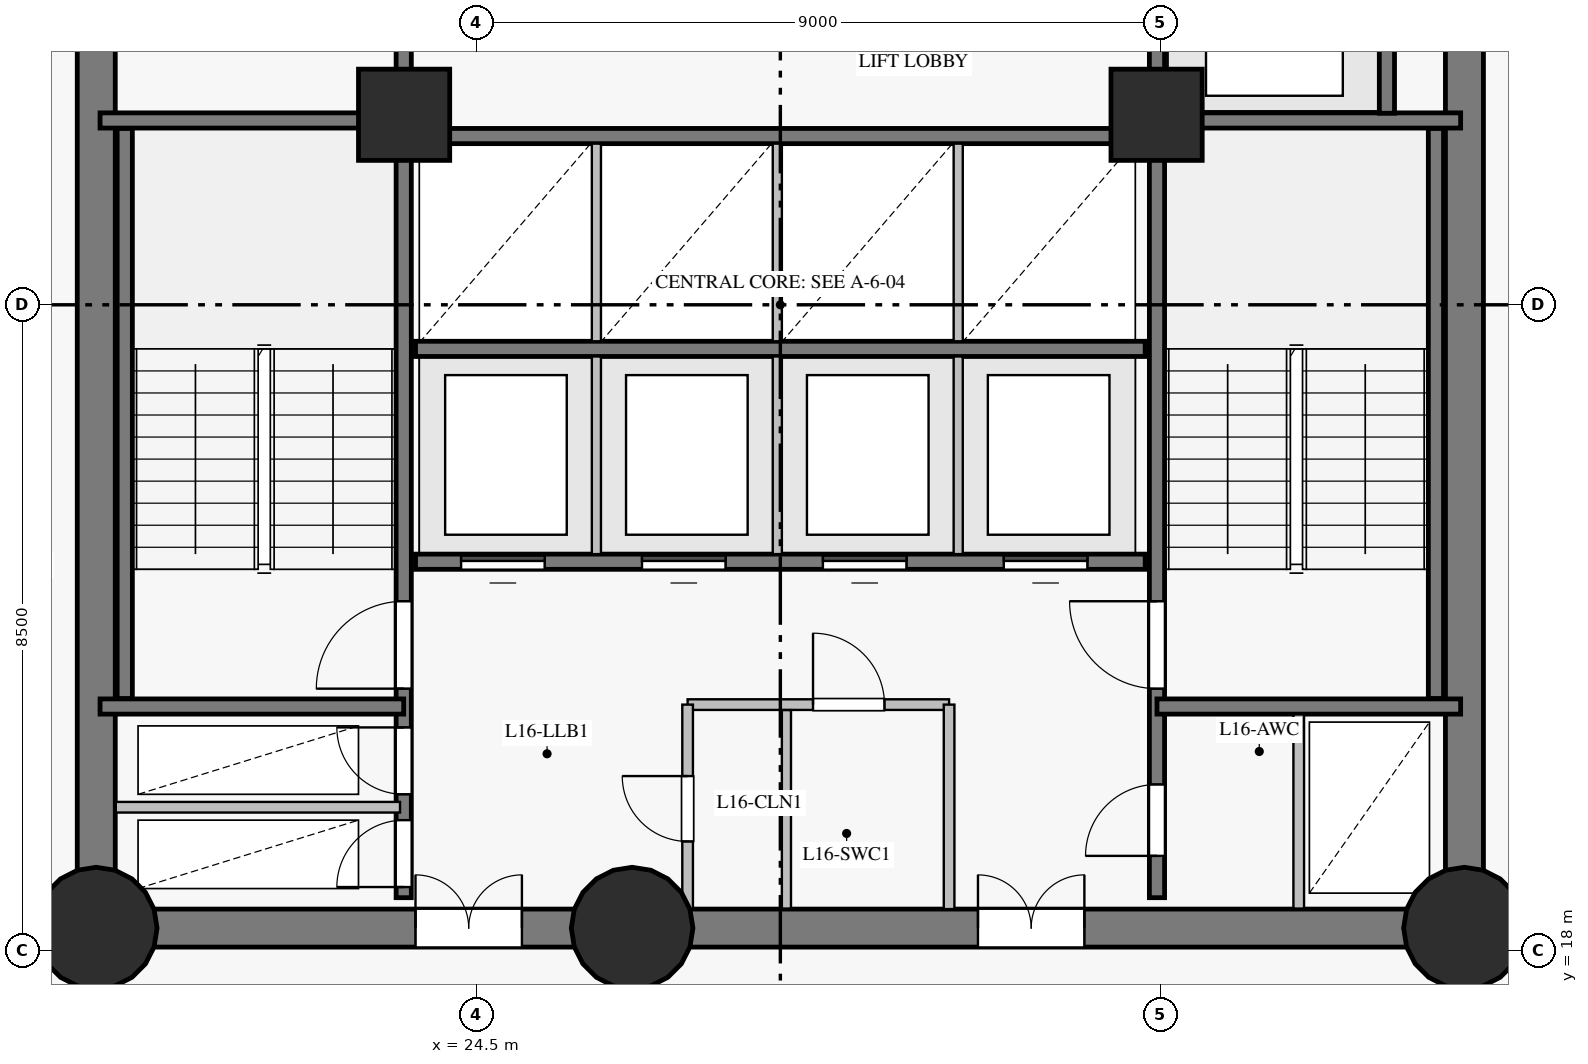
"""IFC4 building model, lengths in metres.
Left out: names, types, materials, properties, quantities, classifications, styles, units other than length and angle.
Written with IfcOpenShell. Run it as: python <this file> out.ifc"""

import sys

from ifc_helpers import new_model, si_unit, direction, frame, frame_2d, origin, origin_with_axes, origin_2d, place, context, subcontext, project, spatial, rectangle, circle, extrude, source, transform, mapped, element, fill, save


model = new_model("IFC4")
c1 = context("Model", 3, precision=1e-05, world=origin(), true_north=direction((0.0, 1.0)))
c2 = subcontext(c1, "Body", "Model", "MODEL_VIEW")
j1 = project(units=[si_unit("LENGTHUNIT", "METRE"), si_unit("PLANEANGLEUNIT", "RADIAN")], contexts=[c1])
p1 = place(None, origin())
s1 = spatial("IfcSite", under=j1, at=p1, CompositionType="ELEMENT")
p2 = place(p1, origin())
s2 = spatial("IfcBuilding", under=s1, at=p2, CompositionType="ELEMENT")
p3 = place(p2, frame((0.0, 0.0, 62.5)))
s3 = spatial("IfcBuildingStorey", under=s2, at=p3, CompositionType="ELEMENT", Elevation=62.5)
p4 = place(p3, frame((19.5, 18.3, 0.0), z_axis=(0.0, 0.0, 1.0), x_axis=(1.0, 0.0, 0.0)))
e1 = element("IfcWall", 1, at=p4, inside=s3, PredefinedType="SHEAR", context=c2, shape_type="SweptSolid", body=[
    extrude(rectangle(XDim=7.05, YDim=0.5, at=frame_2d((3.525, 0.0))), origin(), (0.0, 0.0, 1.0), 3.35),
])
p5 = place(p4, frame((4.2, 0.0, 0.0)))
e2 = element("IfcOpeningElement", 2, at=p5, cuts=e1, PredefinedType="OPENING", context=c2, shape_type="SweptSolid", body=[
    extrude(rectangle(XDim=1.4, YDim=2.2, at=frame_2d((0.7, 1.1))), frame((0.0, 0.26, 0.0), z_axis=(0.0, -1.0, 0.0), x_axis=(1.0, 0.0, 0.0)), (0.0, 0.0, 1.0), 0.52),
])
p6 = place(p3, frame((26.55, 18.3, 0.0), z_axis=(0.0, 0.0, 1.0), x_axis=(1.0, 0.0, 0.0)))
e3 = element("IfcWall", 3, at=p6, inside=s3, PredefinedType="SHEAR", context=c2, shape_type="SweptSolid", body=[
    extrude(rectangle(XDim=10.95, YDim=0.5, at=frame_2d((5.475, 0.0))), origin(), (0.0, 0.0, 1.0), 3.35),
])
p7 = place(p6, frame((4.55, 0.0, 0.0)))
e4 = element("IfcOpeningElement", 4, at=p7, cuts=e3, PredefinedType="OPENING", context=c2, shape_type="SweptSolid", body=[
    extrude(rectangle(XDim=1.4, YDim=2.2, at=frame_2d((0.7, 1.1))), frame((0.0, 0.26, 0.0), z_axis=(0.0, -1.0, 0.0), x_axis=(1.0, 0.0, 0.0)), (0.0, 0.0, 1.0), 0.52),
])
p8 = place(p3, frame((37.5, 18.3, 0.0), z_axis=(0.0, 0.0, 1.0), x_axis=(0.0, 1.0, 0.0)))
e5 = element("IfcWall", 5, at=p8, inside=s3, PredefinedType="SHEAR", context=c2, shape_type="SweptSolid", body=[
    extrude(rectangle(XDim=16.4, YDim=0.5, at=frame_2d((8.2, 0.0))), origin(), (0.0, 0.0, 1.0), 3.35),
])
p9 = place(p8, frame((14.06, 0.0, 0.0)))
e6 = element("IfcOpeningElement", 6, at=p9, cuts=e5, PredefinedType="OPENING", context=c2, shape_type="SweptSolid", body=[
    extrude(rectangle(XDim=1.2, YDim=2.15, at=frame_2d((0.6, 1.075))), frame((0.0, 0.26, 0.0), z_axis=(0.0, -1.0, 0.0), x_axis=(1.0, 0.0, 0.0)), (0.0, 0.0, 1.0), 0.52),
])
p10 = place(p3, frame((19.5, 34.7, 0.0), z_axis=(0.0, 0.0, 1.0), x_axis=(0.0, -1.0, 0.0)))
e7 = element("IfcWall", 7, at=p10, inside=s3, PredefinedType="SHEAR", context=c2, shape_type="SweptSolid", body=[
    extrude(rectangle(XDim=16.4, YDim=0.5, at=frame_2d((8.2, 0.0))), origin(), (0.0, 0.0, 1.0), 3.35),
])
p11 = place(p10, frame((3.1, 0.0, 0.0)))
e8 = element("IfcOpeningElement", 8, at=p11, cuts=e7, PredefinedType="OPENING", context=c2, shape_type="SweptSolid", body=[
    extrude(rectangle(XDim=1.1, YDim=2.15, at=frame_2d((0.55, 1.075))), frame((0.0, 0.26, 0.0), z_axis=(0.0, -1.0, 0.0), x_axis=(1.0, 0.0, 0.0)), (0.0, 0.0, 1.0), 0.52),
])
m1 = source(origin_with_axes(), c2, "Body", "SweptSolid", [
    extrude(circle(Radius=0.8, at=origin_2d()), origin(), (0.0, 0.0, 1.0), 3.6),
])
for number, where, z_axis, x_axis in (
    (9, (19.5, 18.3, 0.0), (0.0, 0.0, 1.0), (1.0, 0.0, 0.0)),
    (10, (26.55, 18.3, 0.0), (0.0, 0.0, 1.0), (1.0, 0.0, 0.0)),
    (11, (37.5, 18.3, 0.0), (0.0, 0.0, 1.0), (1.0, 0.0, 0.0)),
):
    element("IfcColumn", number, at=place(p3, frame(where, z_axis=z_axis, x_axis=x_axis)), inside=s3, PredefinedType="COLUMN", context=c2, shape_type="MappedRepresentation", body=[
        mapped(m1, transform((0.0, 0.0, 0.0), scale=1.0)),
    ])
m2 = source(origin_with_axes(), c2, "Body", "SweptSolid", [
    extrude(rectangle(XDim=1.2, YDim=1.2, at=origin_2d()), origin(), (0.0, 0.0, 1.0), 3.6),
])
for number, where, z_axis, x_axis in (
    (12, (23.55, 29.0, 0.0), (0.0, 0.0, 1.0), (1.0, 0.0, 0.0)),
    (13, (33.45, 29.0, 0.0), (0.0, 0.0, 1.0), (1.0, 0.0, 0.0)),
):
    element("IfcColumn", number, at=place(p3, frame(where, z_axis=z_axis, x_axis=x_axis)), inside=s3, PredefinedType="COLUMN", context=c2, shape_type="MappedRepresentation", body=[
        mapped(m2, transform((0.0, 0.0, 0.0), scale=1.0)),
    ])
p12 = place(p3, frame((23.545, 18.7, 0.0), z_axis=(0.0, 0.0, 1.0), x_axis=(0.0, 1.0, 0.0)))
e14 = element("IfcWall", 14, at=p12, inside=s3, PredefinedType="SHEAR", context=c2, shape_type="SweptSolid", body=[
    extrude(rectangle(XDim=15.6, YDim=0.2, at=frame_2d((7.8, 0.0))), origin(), (0.0, 0.0, 1.0), 3.35),
])
p13 = place(p12, frame((2.75, 0.0, 0.0)))
e15 = element("IfcOpeningElement", 15, at=p13, cuts=e14, PredefinedType="OPENING", context=c2, shape_type="SweptSolid", body=[
    extrude(rectangle(XDim=1.15, YDim=2.15, at=frame_2d((0.575, 1.075))), frame((0.0, 0.11, 0.0), z_axis=(0.0, -1.0, 0.0), x_axis=(1.0, 0.0, 0.0)), (0.0, 0.0, 1.0), 0.22),
])
p14 = place(p12, frame((0.14, 0.0, 0.0)))
e16 = element("IfcOpeningElement", 16, at=p14, cuts=e14, PredefinedType="OPENING", context=c2, shape_type="SweptSolid", body=[
    extrude(rectangle(XDim=0.88, YDim=2.1, at=frame_2d((0.44, 1.05))), frame((0.0, 0.11, 0.0), z_axis=(0.0, -1.0, 0.0), x_axis=(1.0, 0.0, 0.0)), (0.0, 0.0, 1.0), 0.22),
])
p15 = place(p12, frame((1.36, 0.0, 0.0)))
e17 = element("IfcOpeningElement", 17, at=p15, cuts=e14, PredefinedType="OPENING", context=c2, shape_type="SweptSolid", body=[
    extrude(rectangle(XDim=0.88, YDim=2.1, at=frame_2d((0.44, 1.05))), frame((0.0, 0.11, 0.0), z_axis=(0.0, -1.0, 0.0), x_axis=(1.0, 0.0, 0.0)), (0.0, 0.0, 1.0), 0.22),
])
p16 = place(p12, frame((12.1, 0.0, 0.0)))
e18 = element("IfcOpeningElement", 18, at=p16, cuts=e14, PredefinedType="OPENING", context=c2, shape_type="SweptSolid", body=[
    extrude(rectangle(XDim=1.12, YDim=2.15, at=frame_2d((0.56, 1.075))), frame((0.0, 0.11, 0.0), z_axis=(0.0, -1.0, 0.0), x_axis=(1.0, 0.0, 0.0)), (0.0, 0.0, 1.0), 0.22),
])
p17 = place(p12, frame((14.05, 0.0, 0.0)))
e19 = element("IfcOpeningElement", 19, at=p17, cuts=e14, PredefinedType="OPENING", context=c2, shape_type="SweptSolid", body=[
    extrude(rectangle(XDim=1.12, YDim=2.15, at=frame_2d((0.56, 1.075))), frame((0.0, 0.11, 0.0), z_axis=(0.0, -1.0, 0.0), x_axis=(1.0, 0.0, 0.0)), (0.0, 0.0, 1.0), 0.22),
])
p18 = place(p3, frame((33.455, 18.7, 0.0), z_axis=(0.0, 0.0, 1.0), x_axis=(0.0, 1.0, 0.0)))
e20 = element("IfcWall", 20, at=p18, inside=s3, PredefinedType="SHEAR", context=c2, shape_type="SweptSolid", body=[
    extrude(rectangle(XDim=15.6, YDim=0.2, at=frame_2d((7.8, 0.0))), origin(), (0.0, 0.0, 1.0), 3.35),
])
p19 = place(p18, frame((2.75, 0.0, 0.0)))
e21 = element("IfcOpeningElement", 21, at=p19, cuts=e20, PredefinedType="OPENING", context=c2, shape_type="SweptSolid", body=[
    extrude(rectangle(XDim=1.15, YDim=2.15, at=frame_2d((0.575, 1.075))), frame((0.0, 0.11, 0.0), z_axis=(0.0, -1.0, 0.0), x_axis=(1.0, 0.0, 0.0)), (0.0, 0.0, 1.0), 0.22),
])
p20 = place(p18, frame((0.55, 0.0, 0.0)))
e22 = element("IfcOpeningElement", 22, at=p20, cuts=e20, PredefinedType="OPENING", context=c2, shape_type="SweptSolid", body=[
    extrude(rectangle(XDim=0.94, YDim=2.1, at=frame_2d((0.47, 1.05))), frame((0.0, 0.11, 0.0), z_axis=(0.0, -1.0, 0.0), x_axis=(1.0, 0.0, 0.0)), (0.0, 0.0, 1.0), 0.22),
])
p21 = place(p3, frame((23.7, 23.12, 0.0), z_axis=(0.0, 0.0, 1.0), x_axis=(1.0, 0.0, 0.0)))
e23 = element("IfcWall", 23, at=p21, inside=s3, PredefinedType="SHEAR", context=c2, shape_type="SweptSolid", body=[
    extrude(rectangle(XDim=9.6, YDim=0.2, at=frame_2d((4.8, 0.0))), origin(), (0.0, 0.0, 1.0), 3.35),
])
p22 = place(p21, frame((0.6, 0.0, 0.0)))
e24 = element("IfcOpeningElement", 24, at=p22, cuts=e23, PredefinedType="OPENING", context=c2, shape_type="SweptSolid", body=[
    extrude(rectangle(XDim=1.1, YDim=2.15, at=frame_2d((0.55, 1.075))), frame((0.0, 0.11, 0.0), z_axis=(0.0, -1.0, 0.0), x_axis=(1.0, 0.0, 0.0)), (0.0, 0.0, 1.0), 0.22),
])
p23 = place(p21, frame((2.98, 0.0, 0.0)))
e25 = element("IfcOpeningElement", 25, at=p23, cuts=e23, PredefinedType="OPENING", context=c2, shape_type="SweptSolid", body=[
    extrude(rectangle(XDim=1.1, YDim=2.15, at=frame_2d((0.55, 1.075))), frame((0.0, 0.11, 0.0), z_axis=(0.0, -1.0, 0.0), x_axis=(1.0, 0.0, 0.0)), (0.0, 0.0, 1.0), 0.22),
])
p24 = place(p21, frame((5.36, 0.0, 0.0)))
e26 = element("IfcOpeningElement", 26, at=p24, cuts=e23, PredefinedType="OPENING", context=c2, shape_type="SweptSolid", body=[
    extrude(rectangle(XDim=1.1, YDim=2.15, at=frame_2d((0.55, 1.075))), frame((0.0, 0.11, 0.0), z_axis=(0.0, -1.0, 0.0), x_axis=(1.0, 0.0, 0.0)), (0.0, 0.0, 1.0), 0.22),
])
p25 = place(p21, frame((7.74, 0.0, 0.0)))
e27 = element("IfcOpeningElement", 27, at=p25, cuts=e23, PredefinedType="OPENING", context=c2, shape_type="SweptSolid", body=[
    extrude(rectangle(XDim=1.1, YDim=2.15, at=frame_2d((0.55, 1.075))), frame((0.0, 0.11, 0.0), z_axis=(0.0, -1.0, 0.0), x_axis=(1.0, 0.0, 0.0)), (0.0, 0.0, 1.0), 0.22),
])
for number, where, z_axis, x_axis in (
    (28, (23.7, 25.92, 0.0), (0.0, 0.0, 1.0), (1.0, 0.0, 0.0)),
    (29, (23.7, 28.72, 0.0), (0.0, 0.0, 1.0), (1.0, 0.0, 0.0)),
):
    element("IfcWall", number, at=place(p3, frame(where, z_axis=z_axis, x_axis=x_axis)), inside=s3, PredefinedType="SHEAR", context=c2, shape_type="SweptSolid", body=[
        extrude(rectangle(XDim=9.6, YDim=0.2, at=frame_2d((4.8, 0.0))), origin(), (0.0, 0.0, 1.0), 3.35),
    ])
for number, where, z_axis, x_axis in (
    (30, (19.875, 21.32, 0.0), (0.0, 0.0, 1.0), (0.0, 1.0, 0.0)),
    (31, (37.125, 21.32, 0.0), (0.0, 0.0, 1.0), (0.0, 1.0, 0.0)),
):
    element("IfcWall", number, at=place(p3, frame(where, z_axis=z_axis, x_axis=x_axis)), inside=s3, PredefinedType="SHEAR", context=c2, shape_type="SweptSolid", body=[
        extrude(rectangle(XDim=7.5, YDim=0.2, at=frame_2d((3.75, 0.0))), origin(), (0.0, 0.0, 1.0), 3.35),
    ])
for number, where, z_axis, x_axis in (
    (32, (33.455, 21.215, 0.0), (0.0, 0.0, 1.0), (1.0, 0.0, 0.0)),
    (33, (33.455, 28.925, 0.0), (0.0, 0.0, 1.0), (1.0, 0.0, 0.0)),
    (34, (19.55, 21.215, 0.0), (0.0, 0.0, 1.0), (1.0, 0.0, 0.0)),
    (35, (19.55, 28.925, 0.0), (0.0, 0.0, 1.0), (1.0, 0.0, 0.0)),
):
    element("IfcWall", number, at=place(p3, frame(where, z_axis=z_axis, x_axis=x_axis)), inside=s3, PredefinedType="SHEAR", context=c2, shape_type="SweptSolid", body=[
        extrude(rectangle(XDim=3.995, YDim=0.2, at=frame_2d((1.998, 0.0))), origin(), (0.0, 0.0, 1.0), 3.35),
    ])
p26 = place(p3, frame((36.48, 29.02, 0.0), z_axis=(0.0, 0.0, 1.0), x_axis=(0.0, 1.0, 0.0)))
e36 = element("IfcWall", 36, at=p26, inside=s3, PredefinedType="SHEAR", context=c2, shape_type="SweptSolid", body=[
    extrude(rectangle(XDim=2.86, YDim=0.2, at=frame_2d((1.43, 0.0))), origin(), (0.0, 0.0, 1.0), 3.35),
])
p27 = place(p3, frame((19.757, 19.89, 0.0), z_axis=(0.0, 0.0, 1.0), x_axis=(1.0, 0.0, 0.0)))
e37 = element("IfcWall", 37, at=p27, inside=s3, PredefinedType="PARTITIONING", context=c2, shape_type="SweptSolid", body=[
    extrude(rectangle(XDim=3.739, YDim=0.14, at=frame_2d((1.87, 0.0))), origin(), (0.0, 0.0, 1.0), 3.35),
])
p28 = place(p3, frame((27.28, 21.24, 0.0), z_axis=(0.0, 0.0, 1.0), x_axis=(1.0, 0.0, 0.0)))
e38 = element("IfcWall", 38, at=p28, inside=s3, PredefinedType="PARTITIONING", context=c2, shape_type="SweptSolid", body=[
    extrude(rectangle(XDim=3.44, YDim=0.14, at=frame_2d((1.72, 0.0))), origin(), (0.0, 0.0, 1.0), 3.35),
])
p29 = place(p28, frame((1.65, 0.0, 0.0)))
e39 = element("IfcOpeningElement", 39, at=p29, cuts=e38, PredefinedType="OPENING", context=c2, shape_type="SweptSolid", body=[
    extrude(rectangle(XDim=0.94, YDim=2.1, at=frame_2d((0.47, 1.05))), frame((0.0, 0.08, 0.0), z_axis=(0.0, -1.0, 0.0), x_axis=(1.0, 0.0, 0.0)), (0.0, 0.0, 1.0), 0.16),
])
p30 = place(p3, frame((27.28, 18.55, 0.0), z_axis=(0.0, 0.0, 1.0), x_axis=(0.0, 1.0, 0.0)))
e40 = element("IfcWall", 40, at=p30, inside=s3, PredefinedType="PARTITIONING", context=c2, shape_type="SweptSolid", body=[
    extrude(rectangle(XDim=2.69, YDim=0.14, at=frame_2d((1.345, 0.0))), origin(), (0.0, 0.0, 1.0), 3.35),
])
p31 = place(p30, frame((0.89, 0.0, 0.0)))
e41 = element("IfcOpeningElement", 41, at=p31, cuts=e40, PredefinedType="OPENING", context=c2, shape_type="SweptSolid", body=[
    extrude(rectangle(XDim=0.86, YDim=2.1, at=frame_2d((0.43, 1.05))), frame((0.0, 0.08, 0.0), z_axis=(0.0, -1.0, 0.0), x_axis=(1.0, 0.0, 0.0)), (0.0, 0.0, 1.0), 0.16),
])
p32 = place(p3, frame((30.72, 18.55, 0.0), z_axis=(0.0, 0.0, 1.0), x_axis=(0.0, 1.0, 0.0)))
e42 = element("IfcWall", 42, at=p32, inside=s3, PredefinedType="PARTITIONING", context=c2, shape_type="SweptSolid", body=[
    extrude(rectangle(XDim=2.69, YDim=0.14, at=frame_2d((1.345, 0.0))), origin(), (0.0, 0.0, 1.0), 3.35),
])
for number, where, z_axis, x_axis in (
    (43, (26.08, 23.22, 0.0), (0.0, 0.0, 1.0), (0.0, 1.0, 0.0)),
    (44, (28.46, 23.22, 0.0), (0.0, 0.0, 1.0), (0.0, 1.0, 0.0)),
    (45, (30.84, 23.22, 0.0), (0.0, 0.0, 1.0), (0.0, 1.0, 0.0)),
    (46, (26.08, 26.02, 0.0), (0.0, 0.0, 1.0), (0.0, 1.0, 0.0)),
    (47, (28.46, 26.02, 0.0), (0.0, 0.0, 1.0), (0.0, 1.0, 0.0)),
    (48, (30.84, 26.02, 0.0), (0.0, 0.0, 1.0), (0.0, 1.0, 0.0)),
):
    element("IfcWall", number, at=place(p3, frame(where, z_axis=z_axis, x_axis=x_axis)), inside=s3, PredefinedType="PARTITIONING", context=c2, shape_type="SweptSolid", body=[
        extrude(rectangle(XDim=2.6, YDim=0.12, at=frame_2d((1.3, 0.0))), origin(), (0.0, 0.0, 1.0), 3.35),
    ])
p33 = place(p3, frame((28.58, 18.557, 0.0), z_axis=(0.0, 0.0, 1.0), x_axis=(0.0, 1.0, 0.0)))
e49 = element("IfcWall", 49, at=p33, inside=s3, PredefinedType="PARTITIONING", context=c2, shape_type="SweptSolid", body=[
    extrude(rectangle(XDim=2.611, YDim=0.12, at=frame_2d((1.306, 0.0))), origin(), (0.0, 0.0, 1.0), 3.35),
])
p34 = place(p3, frame((35.32, 18.557, 0.0), z_axis=(0.0, 0.0, 1.0), x_axis=(0.0, 1.0, 0.0)))
e50 = element("IfcWall", 50, at=p34, inside=s3, PredefinedType="PARTITIONING", context=c2, shape_type="SweptSolid", body=[
    extrude(rectangle(XDim=2.553, YDim=0.14, at=frame_2d((1.277, 0.0))), origin(), (0.0, 0.0, 1.0), 3.35),
])
m3 = source(origin_with_axes(), c2, "Body", "SweptSolid", [
    extrude(rectangle(XDim=1.15, YDim=2.15, at=frame_2d((0.575, 1.075))), frame((0.0, 0.025, 0.0), z_axis=(0.0, -1.0, 0.0), x_axis=(1.0, 0.0, 0.0)), (0.0, 0.0, 1.0), 0.05),
])
p35 = place(p13, origin())
e51 = element("IfcDoor", 51, at=p35, inside=s3, OperationType="SINGLE_SWING_LEFT", PredefinedType="DOOR", context=c2, shape_type="MappedRepresentation", body=[
    mapped(m3, transform((0.0, 0.0, 0.0), scale=1.0)),
])
fill(e15, e51)
p36 = place(p19, origin())
e52 = element("IfcDoor", 52, at=p36, inside=s3, OperationType="SINGLE_SWING_RIGHT", PredefinedType="DOOR", context=c2, shape_type="MappedRepresentation", body=[
    mapped(m3, transform((0.0, 0.0, 0.0), scale=1.0)),
])
fill(e21, e52)
m4 = source(origin_with_axes(), c2, "Body", "SweptSolid", [
    extrude(rectangle(XDim=0.88, YDim=2.1, at=frame_2d((0.44, 1.05))), frame((0.0, 0.025, 0.0), z_axis=(0.0, -1.0, 0.0), x_axis=(1.0, 0.0, 0.0)), (0.0, 0.0, 1.0), 0.05),
])
p37 = place(p14, origin())
e53 = element("IfcDoor", 53, at=p37, inside=s3, OperationType="SINGLE_SWING_LEFT", PredefinedType="DOOR", context=c2, shape_type="MappedRepresentation", body=[
    mapped(m4, transform((0.0, 0.0, 0.0), scale=1.0)),
])
fill(e16, e53)
p38 = place(p15, origin())
e54 = element("IfcDoor", 54, at=p38, inside=s3, OperationType="SINGLE_SWING_RIGHT", PredefinedType="DOOR", context=c2, shape_type="MappedRepresentation", body=[
    mapped(m4, transform((0.0, 0.0, 0.0), scale=1.0)),
])
fill(e17, e54)
m5 = source(origin_with_axes(), c2, "Body", "SweptSolid", [
    extrude(rectangle(XDim=1.4, YDim=2.2, at=frame_2d((0.7, 1.1))), frame((0.0, 0.025, 0.0), z_axis=(0.0, -1.0, 0.0), x_axis=(1.0, 0.0, 0.0)), (0.0, 0.0, 1.0), 0.05),
])
p39 = place(p5, origin())
e55 = element("IfcDoor", 55, at=p39, inside=s3, OperationType="DOUBLE_DOOR_SINGLE_SWING", PredefinedType="DOOR", context=c2, shape_type="MappedRepresentation", body=[
    mapped(m5, transform((0.0, 0.0, 0.0), scale=1.0)),
])
fill(e2, e55)
p40 = place(p7, origin())
e56 = element("IfcDoor", 56, at=p40, inside=s3, OperationType="DOUBLE_DOOR_SINGLE_SWING", PredefinedType="DOOR", context=c2, shape_type="MappedRepresentation", body=[
    mapped(m5, transform((0.0, 0.0, 0.0), scale=1.0)),
])
fill(e4, e56)
m6 = source(origin_with_axes(), c2, "Body", "SweptSolid", [
    extrude(rectangle(XDim=0.94, YDim=2.1, at=frame_2d((0.47, 1.05))), frame((0.0, 0.025, 0.0), z_axis=(0.0, -1.0, 0.0), x_axis=(1.0, 0.0, 0.0)), (0.0, 0.0, 1.0), 0.05),
])
p41 = place(p20, origin())
e57 = element("IfcDoor", 57, at=p41, inside=s3, OperationType="SINGLE_SWING_LEFT", PredefinedType="DOOR", context=c2, shape_type="MappedRepresentation", body=[
    mapped(m6, transform((0.0, 0.0, 0.0), scale=1.0)),
])
fill(e22, e57)
m7 = source(origin_with_axes(), c2, "Body", "SweptSolid", [
    extrude(rectangle(XDim=0.86, YDim=2.1, at=frame_2d((0.43, 1.05))), frame((0.0, 0.025, 0.0), z_axis=(0.0, -1.0, 0.0), x_axis=(1.0, 0.0, 0.0)), (0.0, 0.0, 1.0), 0.05),
])
p42 = place(p31, origin())
e58 = element("IfcDoor", 58, at=p42, inside=s3, OperationType="SINGLE_SWING_RIGHT", PredefinedType="DOOR", context=c2, shape_type="MappedRepresentation", body=[
    mapped(m7, transform((0.0, 0.0, 0.0), scale=1.0)),
])
fill(e41, e58)
p43 = place(p29, origin())
e59 = element("IfcDoor", 59, at=p43, inside=s3, OperationType="SINGLE_SWING_LEFT", PredefinedType="DOOR", context=c2, shape_type="MappedRepresentation", body=[
    mapped(m6, transform((0.0, 0.0, 0.0), scale=1.0)),
])
fill(e39, e59)
m8 = source(origin_with_axes(), c2, "Body", "SweptSolid", [
    extrude(rectangle(XDim=1.1, YDim=2.15, at=frame_2d((0.55, 1.075))), frame((0.0, 0.025, 0.0), z_axis=(0.0, -1.0, 0.0), x_axis=(1.0, 0.0, 0.0)), (0.0, 0.0, 1.0), 0.05),
])
p44 = place(p22, origin())
e60 = element("IfcDoor", 60, at=p44, inside=s3, OperationType="SLIDING_TO_LEFT", PredefinedType="DOOR", context=c2, shape_type="MappedRepresentation", body=[
    mapped(m8, transform((0.0, 0.0, 0.0), scale=1.0)),
])
fill(e24, e60)
p45 = place(p23, origin())
e61 = element("IfcDoor", 61, at=p45, inside=s3, OperationType="SLIDING_TO_RIGHT", PredefinedType="DOOR", context=c2, shape_type="MappedRepresentation", body=[
    mapped(m8, transform((0.0, 0.0, 0.0), scale=1.0)),
])
fill(e25, e61)
p46 = place(p24, origin())
e62 = element("IfcDoor", 62, at=p46, inside=s3, OperationType="SLIDING_TO_LEFT", PredefinedType="DOOR", context=c2, shape_type="MappedRepresentation", body=[
    mapped(m8, transform((0.0, 0.0, 0.0), scale=1.0)),
])
fill(e26, e62)
p47 = place(p25, origin())
e63 = element("IfcDoor", 63, at=p47, inside=s3, OperationType="SLIDING_TO_RIGHT", PredefinedType="DOOR", context=c2, shape_type="MappedRepresentation", body=[
    mapped(m8, transform((0.0, 0.0, 0.0), scale=1.0)),
])
fill(e27, e63)
save(model, sys.argv[1])
